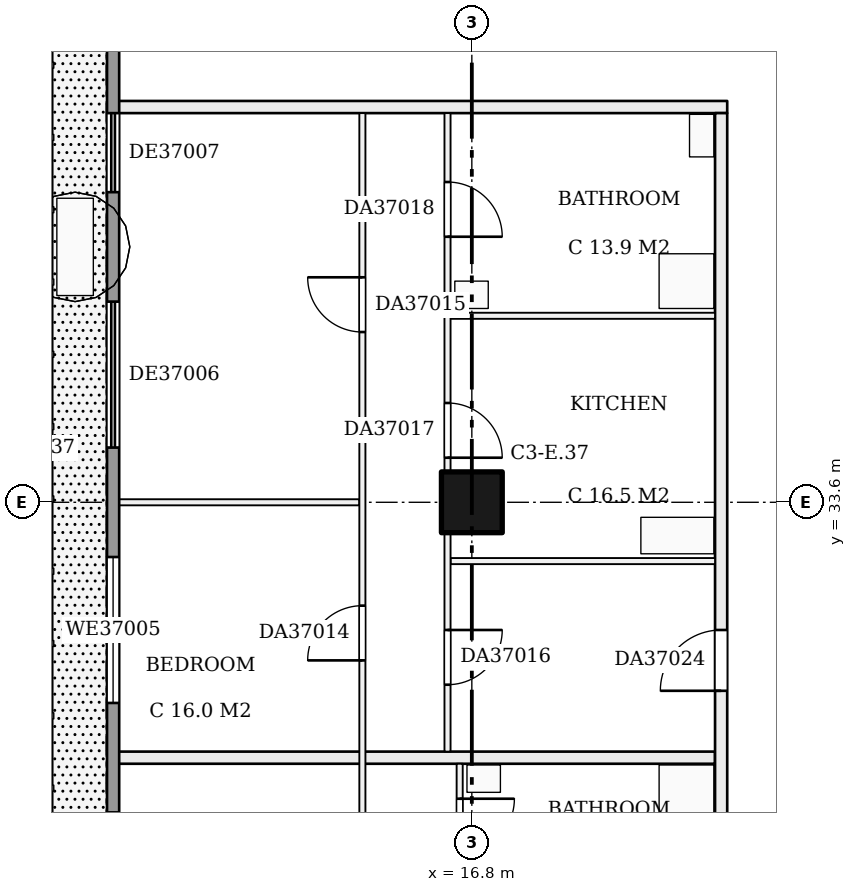
"""IFC4 building model, lengths in metres.
Left out: names, types, materials, properties, quantities, classifications, styles, units other than length and angle.
Written with IfcOpenShell. Run it as: python <this file> out.ifc"""

import sys

from ifc_helpers import new_model, si_unit, direction, frame, frame_2d, origin, origin_2d, place, context, subcontext, project, spatial, rectangle, extrude, element, fill, save


model = new_model("IFC4")
c1 = context("Model", 3, precision=1e-05, world=origin(), true_north=direction((0.0, 1.0)))
c2 = subcontext(c1, "Body", "Model", "MODEL_VIEW")
j1 = project(units=[si_unit("LENGTHUNIT", "METRE"), si_unit("PLANEANGLEUNIT", "RADIAN")], contexts=[c1])
p1 = place(None, origin())
s1 = spatial("IfcSite", under=j1, at=p1, CompositionType="ELEMENT")
p2 = place(p1, origin())
s2 = spatial("IfcBuilding", under=s1, at=p2, CompositionType="ELEMENT")
p3 = place(p2, frame((0.0, 0.0, 147.7)))
s3 = spatial("IfcBuildingStorey", under=s2, at=p3, CompositionType="ELEMENT", Elevation=147.7)
p4 = place(p3, frame((16.8, 33.6, 0.0), z_axis=(0.0, 0.0, 1.0), x_axis=(1.0, 0.0, 0.0)))
e1 = element("IfcColumn", 1, at=p4, inside=s3, PredefinedType="COLUMN", context=c2, shape_type="SweptSolid", body=[
    extrude(rectangle(XDim=1.0, YDim=1.0, at=origin_2d()), origin(), (0.0, 0.0, 1.0), 3.22),
])
p5 = place(p3, frame((10.9, 29.4, 0.0), z_axis=(0.0, 0.0, 1.0), x_axis=(1.0, 0.0, 0.0)))
e2 = element("IfcWall", 2, at=p5, inside=s3, PredefinedType="PARTITIONING", context=c2, shape_type="SweptSolid", body=[
    extrude(rectangle(XDim=9.9, YDim=0.2, at=frame_2d((4.95, 0.0))), origin(), (0.0, 0.0, 1.0), 3.22),
])
p6 = place(p3, frame((16.45, 32.633, 0.0), z_axis=(0.0, 0.0, 1.0), x_axis=(1.0, 0.0, 0.0)))
e3 = element("IfcWall", 3, at=p6, inside=s3, PredefinedType="PARTITIONING", context=c2, shape_type="SweptSolid", body=[
    extrude(rectangle(XDim=4.35, YDim=0.1, at=frame_2d((2.175, 0.0))), origin(), (0.0, 0.0, 1.0), 3.22),
])
p7 = place(p3, frame((10.9, 33.6, 0.0), z_axis=(0.0, 0.0, 1.0), x_axis=(1.0, 0.0, 0.0)))
e4 = element("IfcWall", 4, at=p7, inside=s3, PredefinedType="PARTITIONING", context=c2, shape_type="SweptSolid", body=[
    extrude(rectangle(XDim=4.05, YDim=0.1, at=frame_2d((2.025, 0.0))), origin(), (0.0, 0.0, 1.0), 3.22),
])
p8 = place(p3, frame((16.45, 36.667, 0.0), z_axis=(0.0, 0.0, 1.0), x_axis=(1.0, 0.0, 0.0)))
e5 = element("IfcWall", 5, at=p8, inside=s3, PredefinedType="PARTITIONING", context=c2, shape_type="SweptSolid", body=[
    extrude(rectangle(XDim=4.35, YDim=0.1, at=frame_2d((2.175, 0.0))), origin(), (0.0, 0.0, 1.0), 3.22),
])
p9 = place(p3, frame((10.9, 40.1, 0.0), z_axis=(0.0, 0.0, 1.0), x_axis=(1.0, 0.0, 0.0)))
e6 = element("IfcWall", 6, at=p9, inside=s3, PredefinedType="PARTITIONING", context=c2, shape_type="SweptSolid", body=[
    extrude(rectangle(XDim=10.1, YDim=0.2, at=frame_2d((5.05, 0.0))), origin(), (0.0, 0.0, 1.0), 3.22),
])
p10 = place(p3, frame((15.0, 21.0, 0.0), z_axis=(0.0, 0.0, 1.0), x_axis=(0.0, 1.0, 0.0)))
e7 = element("IfcWall", 7, at=p10, inside=s3, PredefinedType="PARTITIONING", context=c2, shape_type="SweptSolid", body=[
    extrude(rectangle(XDim=19.0, YDim=0.1, at=frame_2d((9.5, 0.0))), origin(), (0.0, 0.0, 1.0), 3.22),
])
p11 = place(p10, frame((1.6, 0.0, 0.0)))
e8 = element("IfcOpeningElement", 8, at=p11, cuts=e7, PredefinedType="OPENING", context=c2, shape_type="SweptSolid", body=[
    extrude(rectangle(XDim=0.9, YDim=2.1, at=frame_2d((0.45, 1.05))), frame((0.0, 0.06, 0.0), z_axis=(0.0, -1.0, 0.0), x_axis=(1.0, 0.0, 0.0)), (0.0, 0.0, 1.0), 0.12),
])
p12 = place(p10, frame((5.8, 0.0, 0.0)))
e9 = element("IfcOpeningElement", 9, at=p12, cuts=e7, PredefinedType="OPENING", context=c2, shape_type="SweptSolid", body=[
    extrude(rectangle(XDim=0.9, YDim=2.1, at=frame_2d((0.45, 1.05))), frame((0.0, 0.06, 0.0), z_axis=(0.0, -1.0, 0.0), x_axis=(1.0, 0.0, 0.0)), (0.0, 0.0, 1.0), 0.12),
])
p13 = place(p10, frame((10.0, 0.0, 0.0)))
e10 = element("IfcOpeningElement", 10, at=p13, cuts=e7, PredefinedType="OPENING", context=c2, shape_type="SweptSolid", body=[
    extrude(rectangle(XDim=0.9, YDim=2.1, at=frame_2d((0.45, 1.05))), frame((0.0, 0.06, 0.0), z_axis=(0.0, -1.0, 0.0), x_axis=(1.0, 0.0, 0.0)), (0.0, 0.0, 1.0), 0.12),
])
p14 = place(p10, frame((15.4, 0.0, 0.0)))
e11 = element("IfcOpeningElement", 11, at=p14, cuts=e7, PredefinedType="OPENING", context=c2, shape_type="SweptSolid", body=[
    extrude(rectangle(XDim=0.9, YDim=2.1, at=frame_2d((0.45, 1.05))), frame((0.0, 0.06, 0.0), z_axis=(0.0, -1.0, 0.0), x_axis=(1.0, 0.0, 0.0)), (0.0, 0.0, 1.0), 0.12),
])
p15 = place(p3, frame((16.4, 29.5, 0.0), z_axis=(0.0, 0.0, 1.0), x_axis=(0.0, 1.0, 0.0)))
e12 = element("IfcWall", 12, at=p15, inside=s3, PredefinedType="PARTITIONING", context=c2, shape_type="SweptSolid", body=[
    extrude(rectangle(XDim=10.5, YDim=0.1, at=frame_2d((5.25, 0.0))), origin(), (0.0, 0.0, 1.0), 3.22),
])
p16 = place(p15, frame((1.1, 0.0, 0.0)))
e13 = element("IfcOpeningElement", 13, at=p16, cuts=e12, PredefinedType="OPENING", context=c2, shape_type="SweptSolid", body=[
    extrude(rectangle(XDim=0.9, YDim=2.1, at=frame_2d((0.45, 1.05))), frame((0.0, 0.06, 0.0), z_axis=(0.0, -1.0, 0.0), x_axis=(1.0, 0.0, 0.0)), (0.0, 0.0, 1.0), 0.12),
])
p17 = place(p15, frame((4.833, 0.0, 0.0)))
e14 = element("IfcOpeningElement", 14, at=p17, cuts=e12, PredefinedType="OPENING", context=c2, shape_type="SweptSolid", body=[
    extrude(rectangle(XDim=0.9, YDim=2.1, at=frame_2d((0.45, 1.05))), frame((0.0, 0.06, 0.0), z_axis=(0.0, -1.0, 0.0), x_axis=(1.0, 0.0, 0.0)), (0.0, 0.0, 1.0), 0.12),
])
p18 = place(p15, frame((8.467, 0.0, 0.0)))
e15 = element("IfcOpeningElement", 15, at=p18, cuts=e12, PredefinedType="OPENING", context=c2, shape_type="SweptSolid", body=[
    extrude(rectangle(XDim=0.9, YDim=2.1, at=frame_2d((0.45, 1.05))), frame((0.0, 0.06, 0.0), z_axis=(0.0, -1.0, 0.0), x_axis=(1.0, 0.0, 0.0)), (0.0, 0.0, 1.0), 0.12),
])
p19 = place(p3, frame((16.6, 21.0, 0.0), z_axis=(0.0, 0.0, 1.0), x_axis=(0.0, 1.0, 0.0)))
e16 = element("IfcWall", 16, at=p19, inside=s3, PredefinedType="PARTITIONING", context=c2, shape_type="SweptSolid", body=[
    extrude(rectangle(XDim=8.3, YDim=0.1, at=frame_2d((4.15, 0.0))), origin(), (0.0, 0.0, 1.0), 3.22),
])
p20 = place(p19, frame((2.2, 0.0, 0.0)))
e17 = element("IfcOpeningElement", 17, at=p20, cuts=e16, PredefinedType="OPENING", context=c2, shape_type="SweptSolid", body=[
    extrude(rectangle(XDim=0.9, YDim=2.1, at=frame_2d((0.45, 1.05))), frame((0.0, 0.06, 0.0), z_axis=(0.0, -1.0, 0.0), x_axis=(1.0, 0.0, 0.0)), (0.0, 0.0, 1.0), 0.12),
])
p21 = place(p19, frame((0.3, 0.0, 0.0)))
e18 = element("IfcOpeningElement", 18, at=p21, cuts=e16, PredefinedType="OPENING", context=c2, shape_type="SweptSolid", body=[
    extrude(rectangle(XDim=0.9, YDim=2.1, at=frame_2d((0.45, 1.05))), frame((0.0, 0.06, 0.0), z_axis=(0.0, -1.0, 0.0), x_axis=(1.0, 0.0, 0.0)), (0.0, 0.0, 1.0), 0.12),
])
p22 = place(p19, frame((4.863, 0.0, 0.0)))
e19 = element("IfcOpeningElement", 19, at=p22, cuts=e16, PredefinedType="OPENING", context=c2, shape_type="SweptSolid", body=[
    extrude(rectangle(XDim=0.9, YDim=2.1, at=frame_2d((0.45, 1.05))), frame((0.0, 0.06, 0.0), z_axis=(0.0, -1.0, 0.0), x_axis=(1.0, 0.0, 0.0)), (0.0, 0.0, 1.0), 0.12),
])
p23 = place(p19, frame((6.825, 0.0, 0.0)))
e20 = element("IfcOpeningElement", 20, at=p23, cuts=e16, PredefinedType="OPENING", context=c2, shape_type="SweptSolid", body=[
    extrude(rectangle(XDim=0.9, YDim=2.1, at=frame_2d((0.45, 1.05))), frame((0.0, 0.06, 0.0), z_axis=(0.0, -1.0, 0.0), x_axis=(1.0, 0.0, 0.0)), (0.0, 0.0, 1.0), 0.12),
])
p24 = place(p3, frame((20.9, 22.8, 0.0), z_axis=(0.0, 0.0, 1.0), x_axis=(0.0, 1.0, 0.0)))
e21 = element("IfcWall", 21, at=p24, inside=s3, PredefinedType="PARTITIONING", context=c2, shape_type="SweptSolid", body=[
    extrude(rectangle(XDim=17.2, YDim=0.2, at=frame_2d((8.6, 0.0))), origin(), (0.0, 0.0, 1.0), 3.22),
])
p25 = place(p24, frame((0.3, 0.0, 0.0)))
e22 = element("IfcOpeningElement", 22, at=p25, cuts=e21, PredefinedType="OPENING", context=c2, shape_type="SweptSolid", body=[
    extrude(rectangle(XDim=1.0, YDim=2.1, at=frame_2d((0.5, 1.05))), frame((0.0, 0.11, 0.0), z_axis=(0.0, -1.0, 0.0), x_axis=(1.0, 0.0, 0.0)), (0.0, 0.0, 1.0), 0.22),
])
p26 = place(p24, frame((7.7, 0.0, 0.0)))
e23 = element("IfcOpeningElement", 23, at=p26, cuts=e21, PredefinedType="OPENING", context=c2, shape_type="SweptSolid", body=[
    extrude(rectangle(XDim=1.0, YDim=2.1, at=frame_2d((0.5, 1.05))), frame((0.0, 0.11, 0.0), z_axis=(0.0, -1.0, 0.0), x_axis=(1.0, 0.0, 0.0)), (0.0, 0.0, 1.0), 0.22),
])
p27 = place(p3, frame((10.9, 42.0, 0.0), z_axis=(0.0, 0.0, 1.0), x_axis=(0.0, -1.0, 0.0)))
e24 = element("IfcWall", 24, at=p27, inside=s3, PredefinedType="SOLIDWALL", context=c2, shape_type="SweptSolid", body=[
    extrude(rectangle(XDim=28.6, YDim=0.2, at=frame_2d((14.3, 0.0))), origin(), (0.0, 0.0, 1.0), 3.22),
])
p28 = place(p27, frame((25.9, 0.0, 0.0)))
e25 = element("IfcOpeningElement", 25, at=p28, cuts=e24, PredefinedType="OPENING", context=c2, shape_type="SweptSolid", body=[
    extrude(rectangle(XDim=2.4, YDim=2.2, at=frame_2d((1.2, 1.1))), frame((0.0, 0.11, 0.0), z_axis=(0.0, -1.0, 0.0), x_axis=(1.0, 0.0, 0.0)), (0.0, 0.0, 1.0), 0.22),
])
p29 = place(p27, frame((21.9, 0.0, 0.0)))
e26 = element("IfcOpeningElement", 26, at=p29, cuts=e24, PredefinedType="OPENING", context=c2, shape_type="SweptSolid", body=[
    extrude(rectangle(XDim=2.4, YDim=2.2, at=frame_2d((1.2, 1.1))), frame((0.0, 0.11, 0.0), z_axis=(0.0, -1.0, 0.0), x_axis=(1.0, 0.0, 0.0)), (0.0, 0.0, 1.0), 0.22),
])
p30 = place(p27, frame((17.7, 0.0, 0.0)))
e27 = element("IfcOpeningElement", 27, at=p30, cuts=e24, PredefinedType="OPENING", context=c2, shape_type="SweptSolid", body=[
    extrude(rectangle(XDim=2.4, YDim=2.2, at=frame_2d((1.2, 1.1))), frame((0.0, 0.11, 0.0), z_axis=(0.0, -1.0, 0.0), x_axis=(1.0, 0.0, 0.0)), (0.0, 0.0, 1.0), 0.22),
])
p31 = place(p27, frame((13.5, 0.0, 0.9)))
e28 = element("IfcOpeningElement", 28, at=p31, cuts=e24, PredefinedType="OPENING", context=c2, shape_type="SweptSolid", body=[
    extrude(rectangle(XDim=2.4, YDim=1.5, at=frame_2d((1.2, 0.75))), frame((0.0, 0.11, 0.0), z_axis=(0.0, -1.0, 0.0), x_axis=(1.0, 0.0, 0.0)), (0.0, 0.0, 1.0), 0.22),
])
p32 = place(p27, frame((9.3, 0.0, 0.9)))
e29 = element("IfcOpeningElement", 29, at=p32, cuts=e24, PredefinedType="OPENING", context=c2, shape_type="SweptSolid", body=[
    extrude(rectangle(XDim=2.4, YDim=1.5, at=frame_2d((1.2, 0.75))), frame((0.0, 0.11, 0.0), z_axis=(0.0, -1.0, 0.0), x_axis=(1.0, 0.0, 0.0)), (0.0, 0.0, 1.0), 0.22),
])
p33 = place(p27, frame((5.1, 0.0, 0.0)))
e30 = element("IfcOpeningElement", 30, at=p33, cuts=e24, PredefinedType="OPENING", context=c2, shape_type="SweptSolid", body=[
    extrude(rectangle(XDim=2.4, YDim=2.2, at=frame_2d((1.2, 1.1))), frame((0.0, 0.11, 0.0), z_axis=(0.0, -1.0, 0.0), x_axis=(1.0, 0.0, 0.0)), (0.0, 0.0, 1.0), 0.22),
])
p34 = place(p27, frame((2.0, 0.0, 0.0)))
e31 = element("IfcOpeningElement", 31, at=p34, cuts=e24, PredefinedType="OPENING", context=c2, shape_type="SweptSolid", body=[
    extrude(rectangle(XDim=1.3, YDim=2.2, at=frame_2d((0.65, 1.1))), frame((0.0, 0.11, 0.0), z_axis=(0.0, -1.0, 0.0), x_axis=(1.0, 0.0, 0.0)), (0.0, 0.0, 1.0), 0.22),
])
p35 = place(p13, origin())
e32 = element("IfcDoor", 32, at=p35, inside=s3, OperationType="SINGLE_SWING_LEFT", PredefinedType="DOOR", context=c2, shape_type="SweptSolid", body=[
    extrude(rectangle(XDim=0.9, YDim=2.1, at=frame_2d((0.45, 1.05))), frame((0.0, 0.025, 0.0), z_axis=(0.0, -1.0, 0.0), x_axis=(1.0, 0.0, 0.0)), (0.0, 0.0, 1.0), 0.05),
])
fill(e10, e32)
p36 = place(p14, origin())
e33 = element("IfcDoor", 33, at=p36, inside=s3, OperationType="SINGLE_SWING_RIGHT", PredefinedType="DOOR", context=c2, shape_type="SweptSolid", body=[
    extrude(rectangle(XDim=0.9, YDim=2.1, at=frame_2d((0.45, 1.05))), frame((0.0, 0.025, 0.0), z_axis=(0.0, -1.0, 0.0), x_axis=(1.0, 0.0, 0.0)), (0.0, 0.0, 1.0), 0.05),
])
fill(e11, e33)
p37 = place(p16, frame((0.9, 0.0, 0.0), z_axis=(0.0, 0.0, 1.0), x_axis=(-1.0, 0.0, 0.0)))
e34 = element("IfcDoor", 34, at=p37, inside=s3, OperationType="SINGLE_SWING_LEFT", PredefinedType="DOOR", context=c2, shape_type="SweptSolid", body=[
    extrude(rectangle(XDim=0.9, YDim=2.1, at=frame_2d((0.45, 1.05))), frame((0.0, 0.025, 0.0), z_axis=(0.0, -1.0, 0.0), x_axis=(1.0, 0.0, 0.0)), (0.0, 0.0, 1.0), 0.05),
])
fill(e13, e34)
p38 = place(p17, frame((0.9, 0.0, 0.0), z_axis=(0.0, 0.0, 1.0), x_axis=(-1.0, 0.0, 0.0)))
e35 = element("IfcDoor", 35, at=p38, inside=s3, OperationType="SINGLE_SWING_RIGHT", PredefinedType="DOOR", context=c2, shape_type="SweptSolid", body=[
    extrude(rectangle(XDim=0.9, YDim=2.1, at=frame_2d((0.45, 1.05))), frame((0.0, 0.025, 0.0), z_axis=(0.0, -1.0, 0.0), x_axis=(1.0, 0.0, 0.0)), (0.0, 0.0, 1.0), 0.05),
])
fill(e14, e35)
p39 = place(p18, frame((0.9, 0.0, 0.0), z_axis=(0.0, 0.0, 1.0), x_axis=(-1.0, 0.0, 0.0)))
e36 = element("IfcDoor", 36, at=p39, inside=s3, OperationType="SINGLE_SWING_RIGHT", PredefinedType="DOOR", context=c2, shape_type="SweptSolid", body=[
    extrude(rectangle(XDim=0.9, YDim=2.1, at=frame_2d((0.45, 1.05))), frame((0.0, 0.025, 0.0), z_axis=(0.0, -1.0, 0.0), x_axis=(1.0, 0.0, 0.0)), (0.0, 0.0, 1.0), 0.05),
])
fill(e15, e36)
p40 = place(p23, frame((0.9, 0.0, 0.0), z_axis=(0.0, 0.0, 1.0), x_axis=(-1.0, 0.0, 0.0)))
e37 = element("IfcDoor", 37, at=p40, inside=s3, OperationType="SINGLE_SWING_LEFT", PredefinedType="DOOR", context=c2, shape_type="SweptSolid", body=[
    extrude(rectangle(XDim=0.9, YDim=2.1, at=frame_2d((0.45, 1.05))), frame((0.0, 0.025, 0.0), z_axis=(0.0, -1.0, 0.0), x_axis=(1.0, 0.0, 0.0)), (0.0, 0.0, 1.0), 0.05),
])
fill(e20, e37)
p41 = place(p26, origin())
e38 = element("IfcDoor", 38, at=p41, inside=s3, OperationType="SINGLE_SWING_LEFT", PredefinedType="DOOR", context=c2, shape_type="SweptSolid", body=[
    extrude(rectangle(XDim=1.0, YDim=2.1, at=frame_2d((0.5, 1.05))), frame((0.0, 0.025, 0.0), z_axis=(0.0, -1.0, 0.0), x_axis=(1.0, 0.0, 0.0)), (0.0, 0.0, 1.0), 0.05),
])
fill(e23, e38)
p42 = place(p32, origin())
e39 = element("IfcWindow", 39, at=p42, inside=s3, PartitioningType="SINGLE_PANEL", PredefinedType="WINDOW", context=c2, shape_type="SweptSolid", body=[
    extrude(rectangle(XDim=2.4, YDim=1.5, at=frame_2d((1.2, 0.75))), frame((0.0, 0.03, 0.0), z_axis=(0.0, -1.0, 0.0), x_axis=(1.0, 0.0, 0.0)), (0.0, 0.0, 1.0), 0.06),
])
fill(e29, e39)
p43 = place(p33, origin())
e40 = element("IfcDoor", 40, at=p43, inside=s3, OperationType="DOUBLE_DOOR_SLIDING", PredefinedType="DOOR", context=c2, shape_type="SweptSolid", body=[
    extrude(rectangle(XDim=2.4, YDim=2.2, at=frame_2d((1.2, 1.1))), frame((0.0, 0.025, 0.0), z_axis=(0.0, -1.0, 0.0), x_axis=(1.0, 0.0, 0.0)), (0.0, 0.0, 1.0), 0.05),
])
fill(e30, e40)
p44 = place(p34, origin())
e41 = element("IfcDoor", 41, at=p44, inside=s3, OperationType="DOUBLE_DOOR_SLIDING", PredefinedType="DOOR", context=c2, shape_type="SweptSolid", body=[
    extrude(rectangle(XDim=1.3, YDim=2.2, at=frame_2d((0.65, 1.1))), frame((0.0, 0.025, 0.0), z_axis=(0.0, -1.0, 0.0), x_axis=(1.0, 0.0, 0.0)), (0.0, 0.0, 1.0), 0.05),
])
fill(e31, e41)
save(model, sys.argv[1])
